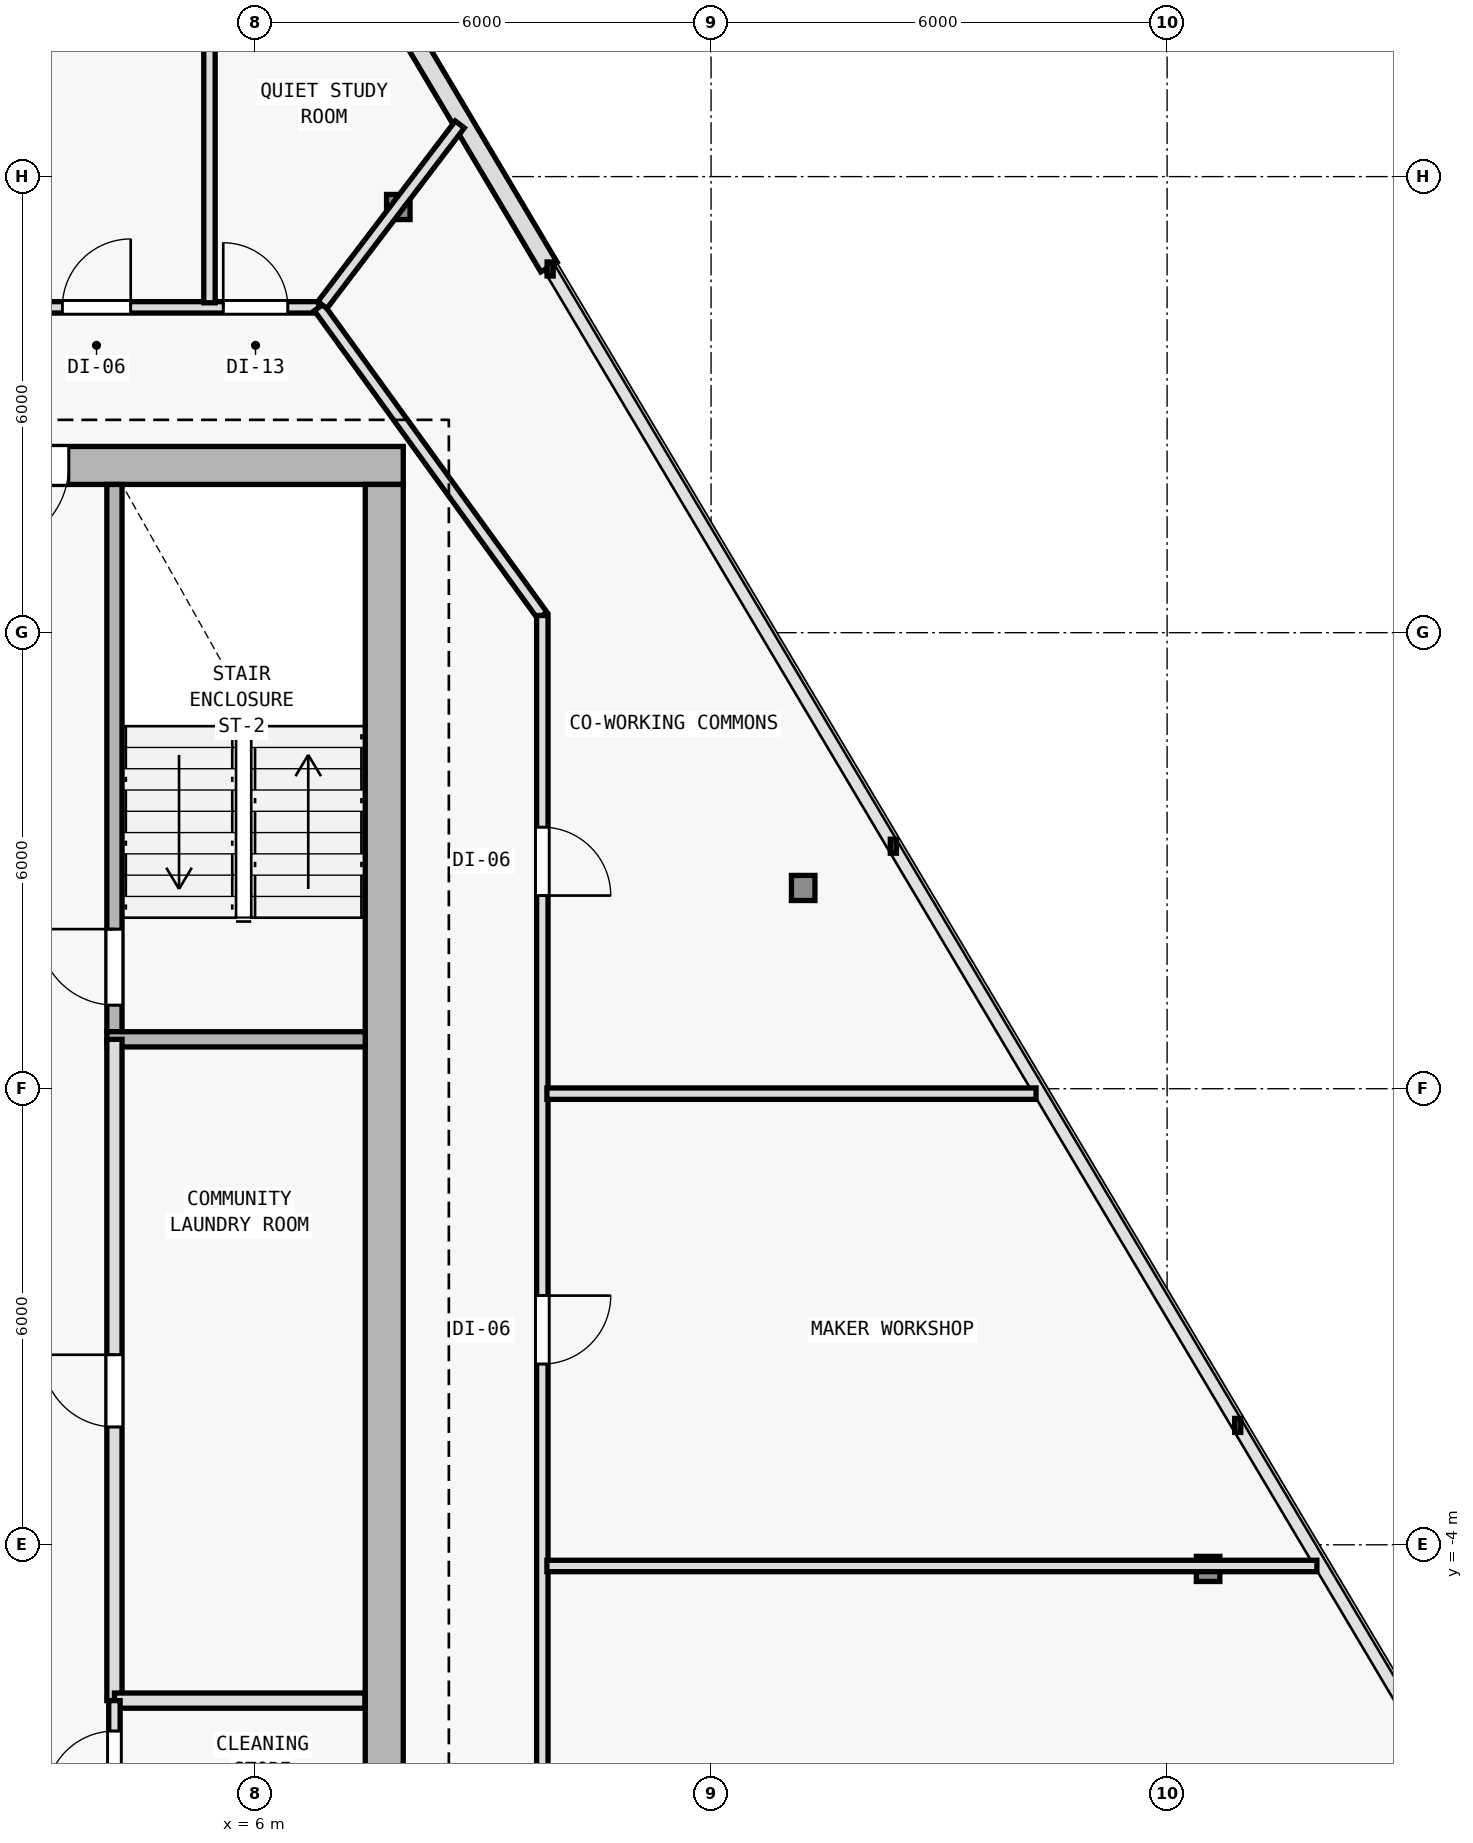
"""IFC4 building model, lengths in metres.
Left out: names, types, materials, properties, quantities, classifications, styles, units other than length and angle.
Written with IfcOpenShell. Run it as: python <this file> out.ifc"""

import sys

from ifc_helpers import new_model, si_unit, direction, frame, frame_2d, origin, origin_2d, place, context, subcontext, project, spatial, rectangle, i_section, extrude, element, fill, save


model = new_model("IFC4")
c1 = context("Model", 3, precision=1e-05, world=origin(), true_north=direction((0.0, 1.0)))
c2 = subcontext(c1, "Body", "Model", "MODEL_VIEW")
j1 = project(units=[si_unit("LENGTHUNIT", "METRE"), si_unit("PLANEANGLEUNIT", "RADIAN")], contexts=[c1])
p1 = place(None, origin())
s1 = spatial("IfcSite", under=j1, at=p1, CompositionType="ELEMENT")
p2 = place(p1, origin())
s2 = spatial("IfcBuilding", under=s1, at=p2, CompositionType="ELEMENT")
p3 = place(p2, frame((0.0, 0.0, 290.4)))
s3 = spatial("IfcBuildingStorey", under=s2, at=p3, CompositionType="ELEMENT", Elevation=290.4)
for number, where, z_axis, x_axis in (
    (1, (7.7, 10.2, 0.0), (0.0, 0.0, 1.0), (1.0, 0.0, 0.0)),
    (2, (7.7, 0.4, 0.0), (0.0, 0.0, 1.0), (1.0, 0.0, 0.0)),
):
    element("IfcColumn", number, at=place(p3, frame(where, z_axis=z_axis, x_axis=x_axis)), inside=s3, PredefinedType="COLUMN", context=c2, shape_type="SweptSolid", body=[
        extrude(i_section(OverallWidth=0.374, OverallDepth=0.372, WebThickness=0.012, FlangeThickness=0.02, FilletRadius=0.015, at=origin_2d()), origin(), (0.0, 0.0, 1.0), 3.6),
    ])
p4 = place(p3, frame((18.539, -4.318, 0.006), z_axis=(-0.026039494941, 0.021620259507, 0.999427090428), x_axis=(-0.638800249892, -0.769372628015, 0.0)))
e3 = element("IfcColumn", 3, at=p4, inside=s3, PredefinedType="COLUMN", context=c2, shape_type="SweptSolid", body=[
    extrude(i_section(OverallWidth=0.309, OverallDepth=0.33, WebThickness=0.011, FlangeThickness=0.019, FilletRadius=0.027, at=origin_2d()), origin(), (0.0, 0.0, 1.0), 3.591),
])
p5 = place(p3, frame((13.212, 4.641, 0.006), z_axis=(-0.018907326549, 0.00952167524, 0.999775900241), x_axis=(-0.449781931574, -0.893138406984, 0.0)))
e4 = element("IfcColumn", 4, at=p5, inside=s3, PredefinedType="COLUMN", context=c2, shape_type="SweptSolid", body=[
    extrude(i_section(OverallWidth=0.309, OverallDepth=0.33, WebThickness=0.011, FlangeThickness=0.019, FilletRadius=0.027, at=origin_2d()), origin(), (0.0, 0.0, 1.0), 3.59),
])
p6 = place(p3, frame((7.885, 13.6, 0.006), z_axis=(-0.011699842352, -0.002516826552, 0.999928387072), x_axis=(0.210305364179, -0.977635746993, 0.0)))
e5 = element("IfcColumn", 5, at=p6, inside=s3, PredefinedType="COLUMN", context=c2, shape_type="SweptSolid", body=[
    extrude(i_section(OverallWidth=0.309, OverallDepth=0.33, WebThickness=0.011, FlangeThickness=0.019, FilletRadius=0.027, at=origin_2d()), origin(), (0.0, 0.0, 1.0), 3.589),
])
p7 = place(p3, frame((5.091, 20.842, 0.0), z_axis=(0.0, 0.0, 1.0), x_axis=(0.511095217069, -0.859524100354, 0.0)))
e6 = element("IfcWall", 6, at=p7, inside=s3, PredefinedType="SOLIDWALL", context=c2, shape_type="SweptSolid", body=[
    extrude(rectangle(XDim=9.344, YDim=0.25, at=frame_2d((4.672, 0.0))), origin(), (0.0, 0.0, 1.0), 3.15),
])
p8 = place(p7, frame((4.122, 0.0, 0.62)))
e7 = element("IfcOpeningElement", 7, at=p8, cuts=e6, PredefinedType="OPENING", context=c2, shape_type="SweptSolid", body=[
    extrude(rectangle(XDim=1.1, YDim=1.8, at=frame_2d((0.55, 0.9))), frame((0.0, 0.135, 0.0), z_axis=(0.0, -1.0, 0.0), x_axis=(1.0, 0.0, 0.0)), (0.0, 0.0, 1.0), 0.27),
])
p9 = place(p3, frame((7.95, 10.2, 0.0), z_axis=(0.0, 0.0, 1.0), x_axis=(-1.0, 0.0, 0.0)))
e8 = element("IfcWall", 8, at=p9, inside=s3, PredefinedType="SHEAR", context=c2, shape_type="SweptSolid", body=[
    extrude(rectangle(XDim=15.9, YDim=0.5, at=frame_2d((7.95, 0.0))), origin(), (0.0, 0.0, 1.0), 3.15),
])
p10 = place(p9, frame((4.4, 0.0, 0.0)))
e9 = element("IfcOpeningElement", 9, at=p10, cuts=e8, PredefinedType="OPENING", context=c2, shape_type="SweptSolid", body=[
    extrude(rectangle(XDim=1.1, YDim=2.15, at=frame_2d((0.55, 1.075))), frame((0.0, 0.26, 0.0), z_axis=(0.0, -1.0, 0.0), x_axis=(1.0, 0.0, 0.0)), (0.0, 0.0, 1.0), 0.52),
])
p11 = place(p3, frame((7.7, 9.95, 0.0), z_axis=(0.0, 0.0, 1.0), x_axis=(0.0, -1.0, 0.0)))
e10 = element("IfcWall", 10, at=p11, inside=s3, PredefinedType="SHEAR", context=c2, shape_type="SweptSolid", body=[
    extrude(rectangle(XDim=19.1, YDim=0.5, at=frame_2d((9.55, 0.0))), origin(), (0.0, 0.0, 1.0), 3.15),
])
p12 = place(p3, frame((4.15, 2.75, 0.0), z_axis=(0.0, 0.0, 1.0), x_axis=(0.0, 1.0, 0.0)))
e11 = element("IfcWall", 11, at=p12, inside=s3, PredefinedType="SOLIDWALL", context=c2, shape_type="SweptSolid", body=[
    extrude(rectangle(XDim=7.2, YDim=0.2, at=frame_2d((3.6, 0.0))), origin(), (0.0, 0.0, 1.0), 3.15),
])
p13 = place(p12, frame((0.35, 0.0, 0.0)))
e12 = element("IfcOpeningElement", 12, at=p13, cuts=e11, PredefinedType="OPENING", context=c2, shape_type="SweptSolid", body=[
    extrude(rectangle(XDim=1.0, YDim=2.15, at=frame_2d((0.5, 1.075))), frame((0.0, 0.11, 0.0), z_axis=(0.0, -1.0, 0.0), x_axis=(1.0, 0.0, 0.0)), (0.0, 0.0, 1.0), 0.22),
])
p14 = place(p3, frame((4.05, 2.65, 0.0), z_axis=(0.0, 0.0, 1.0), x_axis=(1.0, 0.0, 0.0)))
e13 = element("IfcWall", 13, at=p14, inside=s3, PredefinedType="SOLIDWALL", context=c2, shape_type="SweptSolid", body=[
    extrude(rectangle(XDim=3.4, YDim=0.2, at=frame_2d((1.7, 0.0))), origin(), (0.0, 0.0, 1.0), 3.15),
])
p15 = place(p3, frame((4.15, -6.05, 0.0), z_axis=(0.0, 0.0, 1.0), x_axis=(0.0, 1.0, 0.0)))
e14 = element("IfcWall", 14, at=p15, inside=s3, PredefinedType="SOLIDWALL", context=c2, shape_type="SweptSolid", body=[
    extrude(rectangle(XDim=8.7, YDim=0.2, at=frame_2d((4.35, 0.0))), origin(), (0.0, 0.0, 1.0), 3.15),
])
p16 = place(p15, frame((3.6, 0.0, 0.0)))
e15 = element("IfcOpeningElement", 15, at=p16, cuts=e14, PredefinedType="OPENING", context=c2, shape_type="SweptSolid", body=[
    extrude(rectangle(XDim=0.95, YDim=2.1, at=frame_2d((0.475, 1.05))), frame((0.0, 0.11, 0.0), z_axis=(0.0, -1.0, 0.0), x_axis=(1.0, 0.0, 0.0)), (0.0, 0.0, 1.0), 0.22),
])
p17 = place(p3, frame((4.15, -6.05, 0.0), z_axis=(0.0, 0.0, 1.0), x_axis=(1.0, 0.0, 0.0)))
e16 = element("IfcWall", 16, at=p17, inside=s3, PredefinedType="SOLIDWALL", context=c2, shape_type="SweptSolid", body=[
    extrude(rectangle(XDim=3.295, YDim=0.2, at=frame_2d((1.647, 0.0))), origin(), (0.0, 0.0, 1.0), 3.15),
])
p18 = place(p3, frame((4.15, -9.145, 0.0), z_axis=(0.0, 0.0, 1.0), x_axis=(0.0, 1.0, 0.0)))
e17 = element("IfcWall", 17, at=p18, inside=s3, PredefinedType="PARTITIONING", context=c2, shape_type="SweptSolid", body=[
    extrude(rectangle(XDim=3.095, YDim=0.15, at=frame_2d((1.547, 0.0))), origin(), (0.0, 0.0, 1.0), 3.15),
])
p19 = place(p18, frame((0.245, 0.0, 0.0)))
e18 = element("IfcOpeningElement", 18, at=p19, cuts=e17, PredefinedType="OPENING", context=c2, shape_type="SweptSolid", body=[
    extrude(rectangle(XDim=0.9, YDim=2.1, at=frame_2d((0.45, 1.05))), frame((0.0, 0.085, 0.0), z_axis=(0.0, -1.0, 0.0), x_axis=(1.0, 0.0, 0.0)), (0.0, 0.0, 1.0), 0.17),
])
p20 = place(p18, frame((1.795, 0.0, 0.0)))
e19 = element("IfcOpeningElement", 19, at=p20, cuts=e17, PredefinedType="OPENING", context=c2, shape_type="SweptSolid", body=[
    extrude(rectangle(XDim=0.9, YDim=2.1, at=frame_2d((0.45, 1.05))), frame((0.0, 0.085, 0.0), z_axis=(0.0, -1.0, 0.0), x_axis=(1.0, 0.0, 0.0)), (0.0, 0.0, 1.0), 0.17),
])
p21 = place(p3, frame((-6.841, 12.28, 0.0), z_axis=(0.0, 0.0, 1.0), x_axis=(1.0, 0.0, 0.0)))
e20 = element("IfcWall", 20, at=p21, inside=s3, PredefinedType="PARTITIONING", context=c2, shape_type="SweptSolid", body=[
    extrude(rectangle(XDim=13.682, YDim=0.15, at=frame_2d((6.841, 0.0))), origin(), (0.0, 0.0, 1.0), 2.815),
])
p22 = place(p21, frame((12.422, 0.0, 0.0)))
e21 = element("IfcOpeningElement", 21, at=p22, cuts=e20, PredefinedType="OPENING", context=c2, shape_type="SweptSolid", body=[
    extrude(rectangle(XDim=0.85, YDim=2.1, at=frame_2d((0.425, 1.05))), frame((0.0, 0.085, 0.0), z_axis=(0.0, -1.0, 0.0), x_axis=(1.0, 0.0, 0.0)), (0.0, 0.0, 1.0), 0.17),
])
p23 = place(p21, frame((10.305, 0.0, 0.0)))
e22 = element("IfcOpeningElement", 22, at=p23, cuts=e20, PredefinedType="OPENING", context=c2, shape_type="SweptSolid", body=[
    extrude(rectangle(XDim=0.9, YDim=2.1, at=frame_2d((0.45, 1.05))), frame((0.0, 0.085, 0.0), z_axis=(0.0, -1.0, 0.0), x_axis=(1.0, 0.0, 0.0)), (0.0, 0.0, 1.0), 0.17),
])
p24 = place(p21, frame((6.794, 0.0, 0.0)))
e23 = element("IfcOpeningElement", 23, at=p24, cuts=e20, PredefinedType="OPENING", context=c2, shape_type="SweptSolid", body=[
    extrude(rectangle(XDim=0.9, YDim=2.1, at=frame_2d((0.45, 1.05))), frame((0.0, 0.085, 0.0), z_axis=(0.0, -1.0, 0.0), x_axis=(1.0, 0.0, 0.0)), (0.0, 0.0, 1.0), 0.17),
])
p25 = place(p21, frame((2.717, 0.0, 0.0)))
e24 = element("IfcOpeningElement", 24, at=p25, cuts=e20, PredefinedType="OPENING", context=c2, shape_type="SweptSolid", body=[
    extrude(rectangle(XDim=0.9, YDim=2.1, at=frame_2d((0.45, 1.05))), frame((0.0, 0.085, 0.0), z_axis=(0.0, -1.0, 0.0), x_axis=(1.0, 0.0, 0.0)), (0.0, 0.0, 1.0), 0.17),
])
p26 = place(p3, frame((6.841, 12.28, 0.0), z_axis=(0.0, 0.0, 1.0), x_axis=(0.586956386413, -0.809618552436, 0.0)))
e25 = element("IfcWall", 25, at=p26, inside=s3, PredefinedType="PARTITIONING", context=c2, shape_type="SweptSolid", body=[
    extrude(rectangle(XDim=5.008, YDim=0.15, at=frame_2d((2.504, 0.0))), origin(), (0.0, 0.0, 1.0), 2.675),
])
p27 = place(p3, frame((9.78, 8.226, 0.0), z_axis=(0.0, 0.0, 1.0), x_axis=(0.0, -1.0, 0.0)))
e26 = element("IfcWall", 26, at=p27, inside=s3, PredefinedType="PARTITIONING", context=c2, shape_type="SweptSolid", body=[
    extrude(rectangle(XDim=19.706, YDim=0.15, at=frame_2d((9.853, 0.0))), origin(), (0.0, 0.0, 1.0), 2.525),
])
p28 = place(p27, frame((15.566, 0.0, 0.0)))
e27 = element("IfcOpeningElement", 27, at=p28, cuts=e26, PredefinedType="OPENING", context=c2, shape_type="SweptSolid", body=[
    extrude(rectangle(XDim=0.9, YDim=2.1, at=frame_2d((0.45, 1.05))), frame((0.0, 0.085, 0.0), z_axis=(0.0, -1.0, 0.0), x_axis=(1.0, 0.0, 0.0)), (0.0, 0.0, 1.0), 0.17),
])
p29 = place(p27, frame((8.948, 0.0, 0.0)))
e28 = element("IfcOpeningElement", 28, at=p29, cuts=e26, PredefinedType="OPENING", context=c2, shape_type="SweptSolid", body=[
    extrude(rectangle(XDim=0.9, YDim=2.1, at=frame_2d((0.45, 1.05))), frame((0.0, 0.085, 0.0), z_axis=(0.0, -1.0, 0.0), x_axis=(1.0, 0.0, 0.0)), (0.0, 0.0, 1.0), 0.17),
])
p30 = place(p27, frame((2.785, 0.0, 0.0)))
e29 = element("IfcOpeningElement", 29, at=p30, cuts=e26, PredefinedType="OPENING", context=c2, shape_type="SweptSolid", body=[
    extrude(rectangle(XDim=0.9, YDim=2.1, at=frame_2d((0.45, 1.05))), frame((0.0, 0.085, 0.0), z_axis=(0.0, -1.0, 0.0), x_axis=(1.0, 0.0, 0.0)), (0.0, 0.0, 1.0), 0.17),
])
p31 = place(p3, frame((9.84, -4.279, 0.0), z_axis=(0.0, 0.0, 1.0), x_axis=(1.0, 0.0, 0.0)))
e30 = element("IfcWall", 30, at=p31, inside=s3, PredefinedType="PARTITIONING", context=c2, shape_type="SweptSolid", body=[
    extrude(rectangle(XDim=10.131, YDim=0.15, at=frame_2d((5.065, 0.0))), origin(), (0.0, 0.0, 1.0), 2.625),
])
p32 = place(p3, frame((6.886, 12.311, 0.0), z_axis=(0.0, 0.0, 1.0), x_axis=(0.605663695856, 0.795720734631, 0.0)))
e31 = element("IfcWall", 31, at=p32, inside=s3, PredefinedType="PARTITIONING", context=c2, shape_type="SweptSolid", body=[
    extrude(rectangle(XDim=2.985, YDim=0.15, at=frame_2d((1.493, 0.0))), origin(), (0.0, 0.0, 1.0), 2.815),
])
p33 = place(p3, frame((9.84, 1.935, 0.0), z_axis=(0.0, 0.0, 1.0), x_axis=(1.0, 0.0, 0.0)))
e32 = element("IfcWall", 32, at=p33, inside=s3, PredefinedType="PARTITIONING", context=c2, shape_type="SweptSolid", body=[
    extrude(rectangle(XDim=6.436, YDim=0.15, at=frame_2d((3.218, 0.0))), origin(), (0.0, 0.0, 1.0), 2.625),
])
p34 = place(p3, frame((5.4, 12.34, 0.0), z_axis=(0.0, 0.0, 1.0), x_axis=(0.0, 1.0, 0.0)))
e33 = element("IfcWall", 33, at=p34, inside=s3, PredefinedType="PARTITIONING", context=c2, shape_type="SweptSolid", body=[
    extrude(rectangle(XDim=7.885, YDim=0.15, at=frame_2d((3.942, 0.0))), origin(), (0.0, 0.0, 1.0), 2.815),
])
p35 = place(p10, origin())
e34 = element("IfcDoor", 34, at=p35, inside=s3, OperationType="SINGLE_SWING_RIGHT", PredefinedType="DOOR", context=c2, shape_type="SweptSolid", body=[
    extrude(rectangle(XDim=1.1, YDim=2.15, at=frame_2d((0.55, 1.075))), frame((0.0, 0.025, 0.0), z_axis=(0.0, -1.0, 0.0), x_axis=(1.0, 0.0, 0.0)), (0.0, 0.0, 1.0), 0.05),
])
fill(e9, e34)
p36 = place(p13, origin())
e35 = element("IfcDoor", 35, at=p36, inside=s3, OperationType="SINGLE_SWING_RIGHT", PredefinedType="DOOR", context=c2, shape_type="SweptSolid", body=[
    extrude(rectangle(XDim=1.0, YDim=2.15, at=frame_2d((0.5, 1.075))), frame((0.0, 0.025, 0.0), z_axis=(0.0, -1.0, 0.0), x_axis=(1.0, 0.0, 0.0)), (0.0, 0.0, 1.0), 0.05),
])
fill(e12, e35)
p37 = place(p16, origin())
e36 = element("IfcDoor", 36, at=p37, inside=s3, OperationType="SINGLE_SWING_RIGHT", PredefinedType="DOOR", context=c2, shape_type="SweptSolid", body=[
    extrude(rectangle(XDim=0.95, YDim=2.1, at=frame_2d((0.475, 1.05))), frame((0.0, 0.025, 0.0), z_axis=(0.0, -1.0, 0.0), x_axis=(1.0, 0.0, 0.0)), (0.0, 0.0, 1.0), 0.05),
])
fill(e15, e36)
p38 = place(p20, origin())
e37 = element("IfcDoor", 37, at=p38, inside=s3, OperationType="SINGLE_SWING_LEFT", PredefinedType="DOOR", context=c2, shape_type="SweptSolid", body=[
    extrude(rectangle(XDim=0.9, YDim=2.1, at=frame_2d((0.45, 1.05))), frame((0.0, 0.025, 0.0), z_axis=(0.0, -1.0, 0.0), x_axis=(1.0, 0.0, 0.0)), (0.0, 0.0, 1.0), 0.05),
])
fill(e19, e37)
p39 = place(p29, origin())
e38 = element("IfcDoor", 38, at=p39, inside=s3, OperationType="SINGLE_SWING_LEFT", PredefinedType="DOOR", context=c2, shape_type="SweptSolid", body=[
    extrude(rectangle(XDim=0.9, YDim=2.1, at=frame_2d((0.45, 1.05))), frame((0.0, 0.025, 0.0), z_axis=(0.0, -1.0, 0.0), x_axis=(1.0, 0.0, 0.0)), (0.0, 0.0, 1.0), 0.05),
])
fill(e28, e38)
p40 = place(p30, origin())
e39 = element("IfcDoor", 39, at=p40, inside=s3, OperationType="SINGLE_SWING_RIGHT", PredefinedType="DOOR", context=c2, shape_type="SweptSolid", body=[
    extrude(rectangle(XDim=0.9, YDim=2.1, at=frame_2d((0.45, 1.05))), frame((0.0, 0.025, 0.0), z_axis=(0.0, -1.0, 0.0), x_axis=(1.0, 0.0, 0.0)), (0.0, 0.0, 1.0), 0.05),
])
fill(e29, e39)
p41 = place(p22, origin())
e40 = element("IfcDoor", 40, at=p41, inside=s3, OperationType="SINGLE_SWING_LEFT", PredefinedType="DOOR", context=c2, shape_type="SweptSolid", body=[
    extrude(rectangle(XDim=0.85, YDim=2.1, at=frame_2d((0.425, 1.05))), frame((0.0, 0.025, 0.0), z_axis=(0.0, -1.0, 0.0), x_axis=(1.0, 0.0, 0.0)), (0.0, 0.0, 1.0), 0.05),
])
fill(e21, e40)
p42 = place(p23, origin())
e41 = element("IfcDoor", 41, at=p42, inside=s3, OperationType="SINGLE_SWING_RIGHT", PredefinedType="DOOR", context=c2, shape_type="SweptSolid", body=[
    extrude(rectangle(XDim=0.9, YDim=2.1, at=frame_2d((0.45, 1.05))), frame((0.0, 0.025, 0.0), z_axis=(0.0, -1.0, 0.0), x_axis=(1.0, 0.0, 0.0)), (0.0, 0.0, 1.0), 0.05),
])
fill(e22, e41)
save(model, sys.argv[1])
